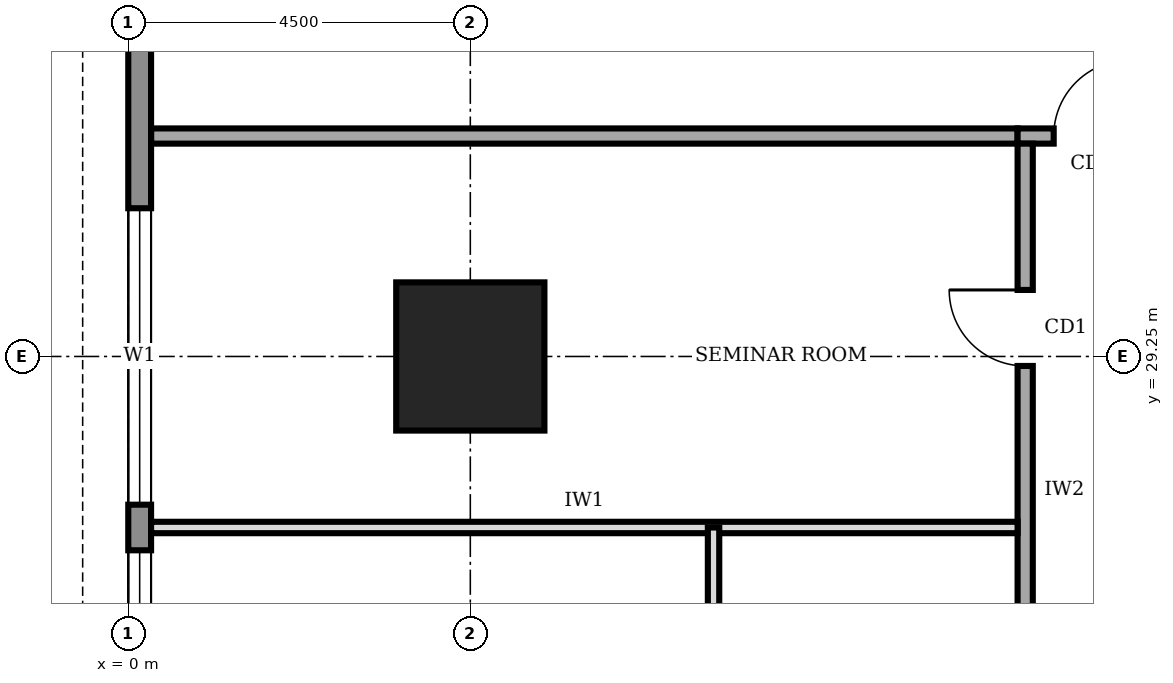
"""IFC4 building model, lengths in metres.
Left out: names, types, materials, properties, quantities, classifications, styles, units other than length and angle.
Written with IfcOpenShell. Run it as: python <this file> out.ifc"""

import sys

from ifc_helpers import new_model, si_unit, direction, frame, frame_2d, origin, origin_2d, place, context, subcontext, project, spatial, rectangle, extrude, element, fill, save


model = new_model("IFC4")
c1 = context("Model", 3, precision=1e-05, world=origin(), true_north=direction((0.0, 1.0)))
c2 = subcontext(c1, "Body", "Model", "MODEL_VIEW")
j1 = project(units=[si_unit("LENGTHUNIT", "METRE"), si_unit("PLANEANGLEUNIT", "RADIAN")], contexts=[c1])
p1 = place(None, origin())
s1 = spatial("IfcSite", under=j1, at=p1, CompositionType="ELEMENT")
p2 = place(p1, origin())
s2 = spatial("IfcBuilding", under=s1, at=p2, CompositionType="ELEMENT")
p3 = place(p2, frame((0.0, 0.0, 225.0)))
s3 = spatial("IfcBuildingStorey", under=s2, at=p3, CompositionType="ELEMENT", Elevation=225.0)
p4 = place(p3, frame((4.5, 29.25, 0.0), z_axis=(0.0, 0.0, 1.0), x_axis=(1.0, 0.0, 0.0)))
e1 = element("IfcColumn", 1, at=p4, inside=s3, PredefinedType="COLUMN", context=c2, shape_type="SweptSolid", body=[
    extrude(rectangle(XDim=1.95, YDim=1.95, at=origin_2d()), origin(), (0.0, 0.0, 1.0), 4.0),
])
p5 = place(p3, frame((0.15, 35.98, 0.0), z_axis=(0.0, 0.0, 1.0), x_axis=(0.0, -1.0, 0.0)))
e2 = element("IfcWall", 2, at=p5, inside=s3, PredefinedType="STANDARD", context=c2, shape_type="SweptSolid", body=[
    extrude(rectangle(XDim=31.46, YDim=0.3, at=frame_2d((15.73, 0.0))), origin(), (0.0, 0.0, 1.0), 3.75),
])
p6 = place(p5, frame((27.28, 0.0, 0.9)))
e3 = element("IfcOpeningElement", 3, at=p6, cuts=e2, PredefinedType="OPENING", context=c2, shape_type="SweptSolid", body=[
    extrude(rectangle(XDim=3.9, YDim=2.2, at=frame_2d((1.95, 1.1))), frame((0.0, 0.16, 0.0), z_axis=(0.0, -1.0, 0.0), x_axis=(1.0, 0.0, 0.0)), (0.0, 0.0, 1.0), 0.32),
])
p7 = place(p5, frame((22.78, 0.0, 0.9)))
e4 = element("IfcOpeningElement", 4, at=p7, cuts=e2, PredefinedType="OPENING", context=c2, shape_type="SweptSolid", body=[
    extrude(rectangle(XDim=3.9, YDim=2.2, at=frame_2d((1.95, 1.1))), frame((0.0, 0.16, 0.0), z_axis=(0.0, -1.0, 0.0), x_axis=(1.0, 0.0, 0.0)), (0.0, 0.0, 1.0), 0.32),
])
p8 = place(p5, frame((18.28, 0.0, 0.9)))
e5 = element("IfcOpeningElement", 5, at=p8, cuts=e2, PredefinedType="OPENING", context=c2, shape_type="SweptSolid", body=[
    extrude(rectangle(XDim=3.9, YDim=2.2, at=frame_2d((1.95, 1.1))), frame((0.0, 0.16, 0.0), z_axis=(0.0, -1.0, 0.0), x_axis=(1.0, 0.0, 0.0)), (0.0, 0.0, 1.0), 0.32),
])
p9 = place(p5, frame((13.78, 0.0, 0.9)))
e6 = element("IfcOpeningElement", 6, at=p9, cuts=e2, PredefinedType="OPENING", context=c2, shape_type="SweptSolid", body=[
    extrude(rectangle(XDim=3.9, YDim=2.2, at=frame_2d((1.95, 1.1))), frame((0.0, 0.16, 0.0), z_axis=(0.0, -1.0, 0.0), x_axis=(1.0, 0.0, 0.0)), (0.0, 0.0, 1.0), 0.32),
])
p10 = place(p5, frame((9.28, 0.0, 0.9)))
e7 = element("IfcOpeningElement", 7, at=p10, cuts=e2, PredefinedType="OPENING", context=c2, shape_type="SweptSolid", body=[
    extrude(rectangle(XDim=3.9, YDim=2.2, at=frame_2d((1.95, 1.1))), frame((0.0, 0.16, 0.0), z_axis=(0.0, -1.0, 0.0), x_axis=(1.0, 0.0, 0.0)), (0.0, 0.0, 1.0), 0.32),
])
p11 = place(p5, frame((4.78, 0.0, 0.9)))
e8 = element("IfcOpeningElement", 8, at=p11, cuts=e2, PredefinedType="OPENING", context=c2, shape_type="SweptSolid", body=[
    extrude(rectangle(XDim=3.9, YDim=2.2, at=frame_2d((1.95, 1.1))), frame((0.0, 0.16, 0.0), z_axis=(0.0, -1.0, 0.0), x_axis=(1.0, 0.0, 0.0)), (0.0, 0.0, 1.0), 0.32),
])
p12 = place(p3, frame((28.6, 32.15, 0.0), z_axis=(0.0, 0.0, 1.0), x_axis=(-1.0, 0.0, 0.0)))
e9 = element("IfcWall", 9, at=p12, inside=s3, PredefinedType="SOLIDWALL", context=c2, shape_type="SweptSolid", body=[
    extrude(rectangle(XDim=16.9, YDim=0.2, at=frame_2d((8.45, 0.0))), origin(), (0.0, 0.0, 1.0), 3.75),
])
p13 = place(p12, frame((15.425, 0.0, 0.0)))
e10 = element("IfcOpeningElement", 10, at=p13, cuts=e9, PredefinedType="OPENING", context=c2, shape_type="SweptSolid", body=[
    extrude(rectangle(XDim=1.0, YDim=2.1, at=frame_2d((0.5, 1.05))), frame((0.0, 0.11, 0.0), z_axis=(0.0, -1.0, 0.0), x_axis=(1.0, 0.0, 0.0)), (0.0, 0.0, 1.0), 0.22),
])
p14 = place(p12, frame((12.35, 0.0, 0.0)))
e11 = element("IfcOpeningElement", 11, at=p14, cuts=e9, PredefinedType="OPENING", context=c2, shape_type="SweptSolid", body=[
    extrude(rectangle(XDim=1.0, YDim=2.1, at=frame_2d((0.5, 1.05))), frame((0.0, 0.11, 0.0), z_axis=(0.0, -1.0, 0.0), x_axis=(1.0, 0.0, 0.0)), (0.0, 0.0, 1.0), 0.22),
])
p15 = place(p12, frame((5.6, 0.0, 0.0)))
e12 = element("IfcOpeningElement", 12, at=p15, cuts=e9, PredefinedType="OPENING", context=c2, shape_type="SweptSolid", body=[
    extrude(rectangle(XDim=1.0, YDim=2.1, at=frame_2d((0.5, 1.05))), frame((0.0, 0.11, 0.0), z_axis=(0.0, -1.0, 0.0), x_axis=(1.0, 0.0, 0.0)), (0.0, 0.0, 1.0), 0.22),
])
p16 = place(p12, frame((0.275, 0.0, 0.0)))
e13 = element("IfcOpeningElement", 13, at=p16, cuts=e9, PredefinedType="OPENING", context=c2, shape_type="SweptSolid", body=[
    extrude(rectangle(XDim=1.0, YDim=2.1, at=frame_2d((0.5, 1.05))), frame((0.0, 0.11, 0.0), z_axis=(0.0, -1.0, 0.0), x_axis=(1.0, 0.0, 0.0)), (0.0, 0.0, 1.0), 0.22),
])
p17 = place(p3, frame((11.8, 32.05, 0.0), z_axis=(0.0, 0.0, 1.0), x_axis=(0.0, -1.0, 0.0)))
e14 = element("IfcWall", 14, at=p17, inside=s3, PredefinedType="SOLIDWALL", context=c2, shape_type="SweptSolid", body=[
    extrude(rectangle(XDim=23.8, YDim=0.2, at=frame_2d((11.9, 0.0))), origin(), (0.0, 0.0, 1.0), 3.75),
])
p18 = place(p17, frame((20.675, 0.0, 0.0)))
e15 = element("IfcOpeningElement", 15, at=p18, cuts=e14, PredefinedType="OPENING", context=c2, shape_type="SweptSolid", body=[
    extrude(rectangle(XDim=1.0, YDim=2.1, at=frame_2d((0.5, 1.05))), frame((0.0, 0.11, 0.0), z_axis=(0.0, -1.0, 0.0), x_axis=(1.0, 0.0, 0.0)), (0.0, 0.0, 1.0), 0.22),
])
p19 = place(p17, frame((16.95, 0.0, 0.0)))
e16 = element("IfcOpeningElement", 16, at=p19, cuts=e14, PredefinedType="OPENING", context=c2, shape_type="SweptSolid", body=[
    extrude(rectangle(XDim=1.0, YDim=2.1, at=frame_2d((0.5, 1.05))), frame((0.0, 0.11, 0.0), z_axis=(0.0, -1.0, 0.0), x_axis=(1.0, 0.0, 0.0)), (0.0, 0.0, 1.0), 0.22),
])
p20 = place(p17, frame((13.95, 0.0, 0.0)))
e17 = element("IfcOpeningElement", 17, at=p20, cuts=e14, PredefinedType="OPENING", context=c2, shape_type="SweptSolid", body=[
    extrude(rectangle(XDim=0.9, YDim=2.1, at=frame_2d((0.45, 1.05))), frame((0.0, 0.11, 0.0), z_axis=(0.0, -1.0, 0.0), x_axis=(1.0, 0.0, 0.0)), (0.0, 0.0, 1.0), 0.22),
])
p21 = place(p17, frame((10.9, 0.0, 0.0)))
e18 = element("IfcOpeningElement", 18, at=p21, cuts=e14, PredefinedType="OPENING", context=c2, shape_type="SweptSolid", body=[
    extrude(rectangle(XDim=0.9, YDim=2.1, at=frame_2d((0.45, 1.05))), frame((0.0, 0.11, 0.0), z_axis=(0.0, -1.0, 0.0), x_axis=(1.0, 0.0, 0.0)), (0.0, 0.0, 1.0), 0.22),
])
p22 = place(p17, frame((6.2, 0.0, 0.0)))
e19 = element("IfcOpeningElement", 19, at=p22, cuts=e14, PredefinedType="OPENING", context=c2, shape_type="SweptSolid", body=[
    extrude(rectangle(XDim=0.9, YDim=2.1, at=frame_2d((0.45, 1.05))), frame((0.0, 0.11, 0.0), z_axis=(0.0, -1.0, 0.0), x_axis=(1.0, 0.0, 0.0)), (0.0, 0.0, 1.0), 0.22),
])
p23 = place(p17, frame((8.75, 0.0, 0.0)))
e20 = element("IfcOpeningElement", 20, at=p23, cuts=e14, PredefinedType="OPENING", context=c2, shape_type="SweptSolid", body=[
    extrude(rectangle(XDim=1.0, YDim=2.1, at=frame_2d((0.5, 1.05))), frame((0.0, 0.11, 0.0), z_axis=(0.0, -1.0, 0.0), x_axis=(1.0, 0.0, 0.0)), (0.0, 0.0, 1.0), 0.22),
])
p24 = place(p17, frame((1.925, 0.0, 0.0)))
e21 = element("IfcOpeningElement", 21, at=p24, cuts=e14, PredefinedType="OPENING", context=c2, shape_type="SweptSolid", body=[
    extrude(rectangle(XDim=1.0, YDim=2.1, at=frame_2d((0.5, 1.05))), frame((0.0, 0.11, 0.0), z_axis=(0.0, -1.0, 0.0), x_axis=(1.0, 0.0, 0.0)), (0.0, 0.0, 1.0), 0.22),
])
p25 = place(p3, frame((0.3, 32.15, 0.0), z_axis=(0.0, 0.0, 1.0), x_axis=(1.0, 0.0, 0.0)))
e22 = element("IfcWall", 22, at=p25, inside=s3, PredefinedType="SOLIDWALL", context=c2, shape_type="SweptSolid", body=[
    extrude(rectangle(XDim=11.4, YDim=0.2, at=frame_2d((5.7, 0.0))), origin(), (0.0, 0.0, 1.0), 3.75),
])
p26 = place(p3, frame((0.3, 27.0, 0.0), z_axis=(0.0, 0.0, 1.0), x_axis=(1.0, 0.0, 0.0)))
e23 = element("IfcWall", 23, at=p26, inside=s3, PredefinedType="PARTITIONING", context=c2, shape_type="SweptSolid", body=[
    extrude(rectangle(XDim=11.4, YDim=0.15, at=frame_2d((5.7, 0.0))), origin(), (0.0, 0.0, 1.0), 3.75),
])
p27 = place(p3, frame((7.7, 23.8, 0.0), z_axis=(0.0, 0.0, 1.0), x_axis=(0.0, 1.0, 0.0)))
e24 = element("IfcWall", 24, at=p27, inside=s3, PredefinedType="PARTITIONING", context=c2, shape_type="SweptSolid", body=[
    extrude(rectangle(XDim=3.2, YDim=0.15, at=frame_2d((1.6, 0.0))), origin(), (0.0, 0.0, 1.0), 3.75),
])
p28 = place(p10, origin())
e25 = element("IfcWindow", 25, at=p28, inside=s3, PartitioningType="SINGLE_PANEL", PredefinedType="WINDOW", context=c2, shape_type="SweptSolid", body=[
    extrude(rectangle(XDim=3.9, YDim=2.2, at=frame_2d((1.95, 1.1))), frame((0.0, 0.03, 0.0), z_axis=(0.0, -1.0, 0.0), x_axis=(1.0, 0.0, 0.0)), (0.0, 0.0, 1.0), 0.06),
])
fill(e7, e25)
p29 = place(p11, origin())
e26 = element("IfcWindow", 26, at=p29, inside=s3, PartitioningType="SINGLE_PANEL", PredefinedType="WINDOW", context=c2, shape_type="SweptSolid", body=[
    extrude(rectangle(XDim=3.9, YDim=2.2, at=frame_2d((1.95, 1.1))), frame((0.0, 0.03, 0.0), z_axis=(0.0, -1.0, 0.0), x_axis=(1.0, 0.0, 0.0)), (0.0, 0.0, 1.0), 0.06),
])
fill(e8, e26)
p30 = place(p13, frame((1.0, 0.0, 0.0), z_axis=(0.0, 0.0, 1.0), x_axis=(-1.0, 0.0, 0.0)))
e27 = element("IfcDoor", 27, at=p30, inside=s3, OperationType="SINGLE_SWING_RIGHT", PredefinedType="DOOR", context=c2, shape_type="SweptSolid", body=[
    extrude(rectangle(XDim=1.0, YDim=2.1, at=frame_2d((0.5, 1.05))), frame((0.0, 0.025, 0.0), z_axis=(0.0, -1.0, 0.0), x_axis=(1.0, 0.0, 0.0)), (0.0, 0.0, 1.0), 0.05),
])
fill(e10, e27)
p31 = place(p24, frame((1.0, 0.0, 0.0), z_axis=(0.0, 0.0, 1.0), x_axis=(-1.0, 0.0, 0.0)))
e28 = element("IfcDoor", 28, at=p31, inside=s3, OperationType="SINGLE_SWING_RIGHT", PredefinedType="DOOR", context=c2, shape_type="SweptSolid", body=[
    extrude(rectangle(XDim=1.0, YDim=2.1, at=frame_2d((0.5, 1.05))), frame((0.0, 0.025, 0.0), z_axis=(0.0, -1.0, 0.0), x_axis=(1.0, 0.0, 0.0)), (0.0, 0.0, 1.0), 0.05),
])
fill(e21, e28)
save(model, sys.argv[1])
